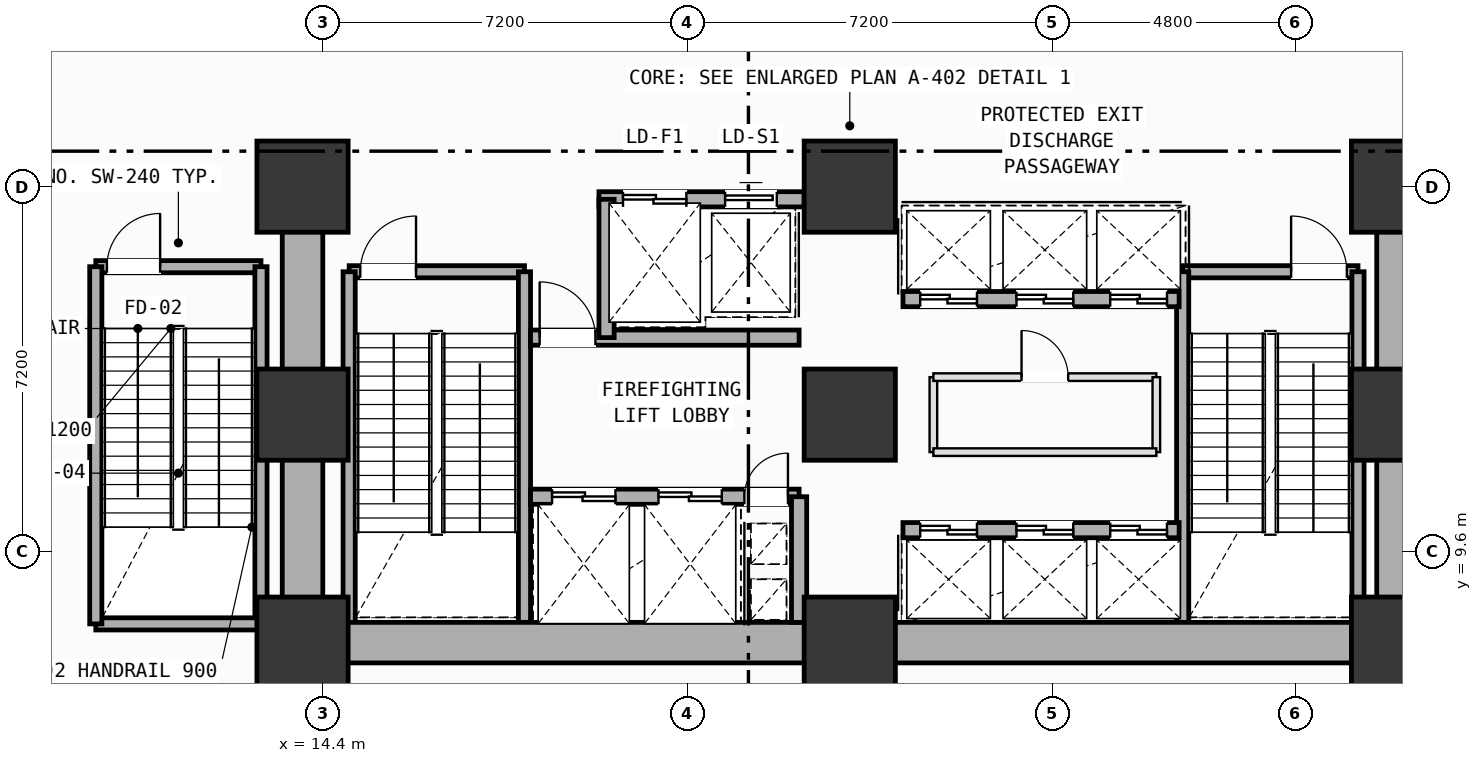
"""IFC4 building model, lengths in metres.
Left out: names, types, materials, properties, quantities, classifications, styles, units other than length and angle.
Written with IfcOpenShell. Run it as: python <this file> out.ifc"""

import sys

from ifc_helpers import new_model, si_unit, direction, frame, frame_2d, origin, origin_2d, place, context, subcontext, project, spatial, rectangle, extrude, element, fill, save


model = new_model("IFC4")
c1 = context("Model", 3, precision=1e-05, world=origin(), true_north=direction((0.0, 1.0)))
c2 = subcontext(c1, "Body", "Model", "MODEL_VIEW")
j1 = project(units=[si_unit("LENGTHUNIT", "METRE"), si_unit("PLANEANGLEUNIT", "RADIAN")], contexts=[c1])
p1 = place(None, origin())
s1 = spatial("IfcSite", under=j1, at=p1, CompositionType="ELEMENT")
p2 = place(p1, origin())
s2 = spatial("IfcBuilding", under=s1, at=p2, CompositionType="ELEMENT")
p3 = place(p2, origin())
s3 = spatial("IfcBuildingStorey", under=s2, at=p3, CompositionType="ELEMENT", Elevation=0.0)
for number, where, z_axis, x_axis in (
    (1, (14.0, 7.8, 0.0), (0.0, 0.0, 1.0), (1.0, 0.0, 0.0)),
    (2, (14.0, 12.3, 0.0), (0.0, 0.0, 1.0), (1.0, 0.0, 0.0)),
    (3, (14.0, 16.8, 0.0), (0.0, 0.0, 1.0), (1.0, 0.0, 0.0)),
    (4, (24.8, 7.8, 0.0), (0.0, 0.0, 1.0), (1.0, 0.0, 0.0)),
    (5, (24.8, 12.3, 0.0), (0.0, 0.0, 1.0), (1.0, 0.0, 0.0)),
    (6, (24.8, 16.8, 0.0), (0.0, 0.0, 1.0), (1.0, 0.0, 0.0)),
    (7, (35.6, 7.8, 0.0), (0.0, 0.0, 1.0), (1.0, 0.0, 0.0)),
    (8, (35.6, 12.3, 0.0), (0.0, 0.0, 1.0), (1.0, 0.0, 0.0)),
    (9, (35.6, 16.8, 0.0), (0.0, 0.0, 1.0), (1.0, 0.0, 0.0)),
):
    element("IfcColumn", number, at=place(p3, frame(where, z_axis=z_axis, x_axis=x_axis)), inside=s3, PredefinedType="COLUMN", context=c2, shape_type="SweptSolid", body=[
        extrude(rectangle(XDim=1.8, YDim=1.8, at=origin_2d()), origin(), (0.0, 0.0, 1.0), 5.4),
    ])
p4 = place(p3, frame((14.92, 15.12, 0.0), z_axis=(0.0, 0.0, 1.0), x_axis=(1.0, 0.0, 0.0)))
e10 = element("IfcWall", 10, at=p4, inside=s3, PredefinedType="SOLIDWALL", context=c2, shape_type="SweptSolid", body=[
    extrude(rectangle(XDim=3.46, YDim=0.24, at=frame_2d((1.73, 0.0))), origin(), (0.0, 0.0, 1.0), 5.15),
])
p5 = place(p4, frame((0.22, 0.0, 0.0)))
e11 = element("IfcOpeningElement", 11, at=p5, cuts=e10, PredefinedType="OPENING", context=c2, shape_type="SweptSolid", body=[
    extrude(rectangle(XDim=1.1, YDim=2.15, at=frame_2d((0.55, 1.075))), frame((0.0, 0.13, 0.0), z_axis=(0.0, -1.0, 0.0), x_axis=(1.0, 0.0, 0.0)), (0.0, 0.0, 1.0), 0.26),
])
for number, where, z_axis, x_axis in (
    (12, (18.38, 15.12, 0.0), (0.0, 0.0, 1.0), (0.0, -1.0, 0.0)),
    (13, (14.92, 8.2, 0.0), (0.0, 0.0, 1.0), (0.0, 1.0, 0.0)),
):
    element("IfcWall", number, at=place(p3, frame(where, z_axis=z_axis, x_axis=x_axis)), inside=s3, PredefinedType="SOLIDWALL", context=c2, shape_type="SweptSolid", body=[
        extrude(rectangle(XDim=6.92, YDim=0.24, at=frame_2d((3.46, 0.0))), origin(), (0.0, 0.0, 1.0), 5.15),
    ])
p6 = place(p3, frame((31.37, 15.12, 0.0), z_axis=(0.0, 0.0, 1.0), x_axis=(1.0, 0.0, 0.0)))
e14 = element("IfcWall", 14, at=p6, inside=s3, PredefinedType="SOLIDWALL", context=c2, shape_type="SweptSolid", body=[
    extrude(rectangle(XDim=3.46, YDim=0.24, at=frame_2d((1.73, 0.0))), origin(), (0.0, 0.0, 1.0), 5.15),
])
p7 = place(p6, frame((2.14, 0.0, 0.0)))
e15 = element("IfcOpeningElement", 15, at=p7, cuts=e14, PredefinedType="OPENING", context=c2, shape_type="SweptSolid", body=[
    extrude(rectangle(XDim=1.1, YDim=2.15, at=frame_2d((0.55, 1.075))), frame((0.0, 0.13, 0.0), z_axis=(0.0, -1.0, 0.0), x_axis=(1.0, 0.0, 0.0)), (0.0, 0.0, 1.0), 0.26),
])
for number, where, z_axis, x_axis in (
    (16, (34.83, 15.12, 0.0), (0.0, 0.0, 1.0), (0.0, -1.0, 0.0)),
    (17, (31.37, 8.2, 0.0), (0.0, 0.0, 1.0), (0.0, 1.0, 0.0)),
):
    element("IfcWall", number, at=place(p3, frame(where, z_axis=z_axis, x_axis=x_axis)), inside=s3, PredefinedType="SOLIDWALL", context=c2, shape_type="SweptSolid", body=[
        extrude(rectangle(XDim=6.92, YDim=0.24, at=frame_2d((3.46, 0.0))), origin(), (0.0, 0.0, 1.0), 5.15),
    ])
p8 = place(p3, frame((9.92, 15.22, 0.0), z_axis=(0.0, 0.0, 1.0), x_axis=(1.0, 0.0, 0.0)))
e18 = element("IfcWall", 18, at=p8, inside=s3, PredefinedType="SOLIDWALL", context=c2, shape_type="SweptSolid", body=[
    extrude(rectangle(XDim=3.26, YDim=0.24, at=frame_2d((1.63, 0.0))), origin(), (0.0, 0.0, 1.0), 5.15),
])
p9 = place(p8, frame((0.22, 0.0, 0.0)))
e19 = element("IfcOpeningElement", 19, at=p9, cuts=e18, PredefinedType="OPENING", context=c2, shape_type="SweptSolid", body=[
    extrude(rectangle(XDim=1.05, YDim=2.15, at=frame_2d((0.525, 1.075))), frame((0.0, 0.13, 0.0), z_axis=(0.0, -1.0, 0.0), x_axis=(1.0, 0.0, 0.0)), (0.0, 0.0, 1.0), 0.26),
])
p10 = place(p3, frame((13.18, 15.22, 0.0), z_axis=(0.0, 0.0, 1.0), x_axis=(0.0, -1.0, 0.0)))
e20 = element("IfcWall", 20, at=p10, inside=s3, PredefinedType="SOLIDWALL", context=c2, shape_type="SweptSolid", body=[
    extrude(rectangle(XDim=7.05, YDim=0.24, at=frame_2d((3.525, 0.0))), origin(), (0.0, 0.0, 1.0), 5.15),
])
p11 = place(p3, frame((13.18, 8.17, 0.0), z_axis=(0.0, 0.0, 1.0), x_axis=(-1.0, 0.0, 0.0)))
e21 = element("IfcWall", 21, at=p11, inside=s3, PredefinedType="SOLIDWALL", context=c2, shape_type="SweptSolid", body=[
    extrude(rectangle(XDim=3.26, YDim=0.24, at=frame_2d((1.63, 0.0))), origin(), (0.0, 0.0, 1.0), 5.15),
])
p12 = place(p3, frame((9.92, 8.17, 0.0), z_axis=(0.0, 0.0, 1.0), x_axis=(0.0, 1.0, 0.0)))
e22 = element("IfcWall", 22, at=p12, inside=s3, PredefinedType="SOLIDWALL", context=c2, shape_type="SweptSolid", body=[
    extrude(rectangle(XDim=7.05, YDim=0.24, at=frame_2d((3.525, 0.0))), origin(), (0.0, 0.0, 1.0), 5.15),
])
for number, where, z_axis, x_axis in (
    (23, (14.0, 7.8, 0.0), (0.0, 0.0, 1.0), (1.0, 0.0, 0.0)),
    (24, (24.8, 7.8, 0.0), (0.0, 0.0, 1.0), (1.0, 0.0, 0.0)),
):
    element("IfcWall", number, at=place(p3, frame(where, z_axis=z_axis, x_axis=x_axis)), inside=s3, PredefinedType="SHEAR", context=c2, shape_type="SweptSolid", body=[
        extrude(rectangle(XDim=10.8, YDim=0.8, at=frame_2d((5.4, 0.0))), origin(), (0.0, 0.0, 1.0), 5.15),
    ])
for number, where, z_axis, x_axis in (
    (25, (35.6, 7.8, 0.0), (0.0, 0.0, 1.0), (0.0, 1.0, 0.0)),
    (26, (14.0, 16.8, 0.0), (0.0, 0.0, 1.0), (0.0, -1.0, 0.0)),
):
    element("IfcWall", number, at=place(p3, frame(where, z_axis=z_axis, x_axis=x_axis)), inside=s3, PredefinedType="SHEAR", context=c2, shape_type="SweptSolid", body=[
        extrude(rectangle(XDim=9.0, YDim=0.8, at=frame_2d((4.5, 0.0))), origin(), (0.0, 0.0, 1.0), 5.15),
    ])
p13 = place(p3, frame((19.85, 16.55, 0.0), z_axis=(0.0, 0.0, 1.0), x_axis=(1.0, 0.0, 0.0)))
e27 = element("IfcWall", 27, at=p13, inside=s3, PredefinedType="SOLIDWALL", context=c2, shape_type="SweptSolid", body=[
    extrude(rectangle(XDim=4.05, YDim=0.3, at=frame_2d((2.025, 0.0))), origin(), (0.0, 0.0, 1.0), 5.15),
])
p14 = place(p13, frame((0.475, 0.0, 0.0)))
e28 = element("IfcOpeningElement", 28, at=p14, cuts=e27, PredefinedType="OPENING", context=c2, shape_type="SweptSolid", body=[
    extrude(rectangle(XDim=1.25, YDim=2.18, at=frame_2d((0.625, 1.09))), frame((0.0, 0.16, 0.0), z_axis=(0.0, -1.0, 0.0), x_axis=(1.0, 0.0, 0.0)), (0.0, 0.0, 1.0), 0.32),
])
p15 = place(p13, frame((2.49, 0.0, 0.0)))
e29 = element("IfcOpeningElement", 29, at=p15, cuts=e27, PredefinedType="OPENING", context=c2, shape_type="SweptSolid", body=[
    extrude(rectangle(XDim=1.02, YDim=2.12, at=frame_2d((0.51, 1.06))), frame((0.0, 0.16, 0.0), z_axis=(0.0, -1.0, 0.0), x_axis=(1.0, 0.0, 0.0)), (0.0, 0.0, 1.0), 0.32),
])
p16 = place(p3, frame((18.5, 10.68, 0.0), z_axis=(0.0, 0.0, 1.0), x_axis=(1.0, 0.0, 0.0)))
e30 = element("IfcWall", 30, at=p16, inside=s3, PredefinedType="SOLIDWALL", context=c2, shape_type="SweptSolid", body=[
    extrude(rectangle(XDim=5.3, YDim=0.3, at=frame_2d((2.65, 0.0))), origin(), (0.0, 0.0, 1.0), 5.15),
])
p17 = place(p16, frame((4.22, 0.0, 0.0)))
e31 = element("IfcOpeningElement", 31, at=p17, cuts=e30, PredefinedType="OPENING", context=c2, shape_type="SweptSolid", body=[
    extrude(rectangle(XDim=0.86, YDim=2.06, at=frame_2d((0.43, 1.03))), frame((0.0, 0.16, 0.0), z_axis=(0.0, -1.0, 0.0), x_axis=(1.0, 0.0, 0.0)), (0.0, 0.0, 1.0), 0.32),
])
p18 = place(p16, frame((0.425, 0.0, 0.0)))
e32 = element("IfcOpeningElement", 32, at=p18, cuts=e30, PredefinedType="OPENING", context=c2, shape_type="SweptSolid", body=[
    extrude(rectangle(XDim=1.25, YDim=2.18, at=frame_2d((0.625, 1.09))), frame((0.0, 0.16, 0.0), z_axis=(0.0, -1.0, 0.0), x_axis=(1.0, 0.0, 0.0)), (0.0, 0.0, 1.0), 0.32),
])
p19 = place(p16, frame((2.525, 0.0, 0.0)))
e33 = element("IfcOpeningElement", 33, at=p19, cuts=e30, PredefinedType="OPENING", context=c2, shape_type="SweptSolid", body=[
    extrude(rectangle(XDim=1.25, YDim=2.18, at=frame_2d((0.625, 1.09))), frame((0.0, 0.16, 0.0), z_axis=(0.0, -1.0, 0.0), x_axis=(1.0, 0.0, 0.0)), (0.0, 0.0, 1.0), 0.32),
])
p20 = place(p3, frame((18.5, 13.82, 0.0), z_axis=(0.0, 0.0, 1.0), x_axis=(1.0, 0.0, 0.0)))
e34 = element("IfcWall", 34, at=p20, inside=s3, PredefinedType="SOLIDWALL", context=c2, shape_type="SweptSolid", body=[
    extrude(rectangle(XDim=5.3, YDim=0.3, at=frame_2d((2.65, 0.0))), origin(), (0.0, 0.0, 1.0), 5.15),
])
p21 = place(p20, frame((0.18, 0.0, 0.0)))
e35 = element("IfcOpeningElement", 35, at=p21, cuts=e34, PredefinedType="OPENING", context=c2, shape_type="SweptSolid", body=[
    extrude(rectangle(XDim=1.1, YDim=2.15, at=frame_2d((0.55, 1.075))), frame((0.0, 0.16, 0.0), z_axis=(0.0, -1.0, 0.0), x_axis=(1.0, 0.0, 0.0)), (0.0, 0.0, 1.0), 0.32),
])
p22 = place(p3, frame((23.8, 8.2, 0.0), z_axis=(0.0, 0.0, 1.0), x_axis=(0.0, 1.0, 0.0)))
e36 = element("IfcWall", 36, at=p22, inside=s3, PredefinedType="SOLIDWALL", context=c2, shape_type="SweptSolid", body=[
    extrude(rectangle(XDim=2.48, YDim=0.3, at=frame_2d((1.24, 0.0))), origin(), (0.0, 0.0, 1.0), 5.15),
])
p23 = place(p3, frame((20.0, 13.82, 0.0), z_axis=(0.0, 0.0, 1.0), x_axis=(0.0, 1.0, 0.0)))
e37 = element("IfcWall", 37, at=p23, inside=s3, PredefinedType="SOLIDWALL", context=c2, shape_type="SweptSolid", body=[
    extrude(rectangle(XDim=2.73, YDim=0.3, at=frame_2d((1.365, 0.0))), origin(), (0.0, 0.0, 1.0), 5.15),
])
p24 = place(p3, frame((25.85, 10.02, 0.0), z_axis=(0.0, 0.0, 1.0), x_axis=(1.0, 0.0, 0.0)))
e38 = element("IfcWall", 38, at=p24, inside=s3, PredefinedType="SOLIDWALL", context=c2, shape_type="SweptSolid", body=[
    extrude(rectangle(XDim=5.45, YDim=0.3, at=frame_2d((2.725, 0.0))), origin(), (0.0, 0.0, 1.0), 5.15),
])
p25 = place(p24, frame((0.34, 0.0, 0.0)))
e39 = element("IfcOpeningElement", 39, at=p25, cuts=e38, PredefinedType="OPENING", context=c2, shape_type="SweptSolid", body=[
    extrude(rectangle(XDim=1.12, YDim=2.15, at=frame_2d((0.56, 1.075))), frame((0.0, 0.16, 0.0), z_axis=(0.0, -1.0, 0.0), x_axis=(1.0, 0.0, 0.0)), (0.0, 0.0, 1.0), 0.32),
])
p26 = place(p24, frame((2.24, 0.0, 0.0)))
e40 = element("IfcOpeningElement", 40, at=p26, cuts=e38, PredefinedType="OPENING", context=c2, shape_type="SweptSolid", body=[
    extrude(rectangle(XDim=1.12, YDim=2.15, at=frame_2d((0.56, 1.075))), frame((0.0, 0.16, 0.0), z_axis=(0.0, -1.0, 0.0), x_axis=(1.0, 0.0, 0.0)), (0.0, 0.0, 1.0), 0.32),
])
p27 = place(p24, frame((4.09, 0.0, 0.0)))
e41 = element("IfcOpeningElement", 41, at=p27, cuts=e38, PredefinedType="OPENING", context=c2, shape_type="SweptSolid", body=[
    extrude(rectangle(XDim=1.12, YDim=2.15, at=frame_2d((0.56, 1.075))), frame((0.0, 0.16, 0.0), z_axis=(0.0, -1.0, 0.0), x_axis=(1.0, 0.0, 0.0)), (0.0, 0.0, 1.0), 0.32),
])
p28 = place(p3, frame((25.85, 14.58, 0.0), z_axis=(0.0, 0.0, 1.0), x_axis=(1.0, 0.0, 0.0)))
e42 = element("IfcWall", 42, at=p28, inside=s3, PredefinedType="SOLIDWALL", context=c2, shape_type="SweptSolid", body=[
    extrude(rectangle(XDim=5.45, YDim=0.3, at=frame_2d((2.725, 0.0))), origin(), (0.0, 0.0, 1.0), 5.15),
])
p29 = place(p28, frame((0.34, 0.0, 0.0)))
e43 = element("IfcOpeningElement", 43, at=p29, cuts=e42, PredefinedType="OPENING", context=c2, shape_type="SweptSolid", body=[
    extrude(rectangle(XDim=1.12, YDim=2.15, at=frame_2d((0.56, 1.075))), frame((0.0, 0.16, 0.0), z_axis=(0.0, -1.0, 0.0), x_axis=(1.0, 0.0, 0.0)), (0.0, 0.0, 1.0), 0.32),
])
p30 = place(p28, frame((2.24, 0.0, 0.0)))
e44 = element("IfcOpeningElement", 44, at=p30, cuts=e42, PredefinedType="OPENING", context=c2, shape_type="SweptSolid", body=[
    extrude(rectangle(XDim=1.12, YDim=2.15, at=frame_2d((0.56, 1.075))), frame((0.0, 0.16, 0.0), z_axis=(0.0, -1.0, 0.0), x_axis=(1.0, 0.0, 0.0)), (0.0, 0.0, 1.0), 0.32),
])
p31 = place(p28, frame((4.09, 0.0, 0.0)))
e45 = element("IfcOpeningElement", 45, at=p31, cuts=e42, PredefinedType="OPENING", context=c2, shape_type="SweptSolid", body=[
    extrude(rectangle(XDim=1.12, YDim=2.15, at=frame_2d((0.56, 1.075))), frame((0.0, 0.16, 0.0), z_axis=(0.0, -1.0, 0.0), x_axis=(1.0, 0.0, 0.0)), (0.0, 0.0, 1.0), 0.32),
])
p32 = place(p3, frame((26.45, 11.56, 0.0), z_axis=(0.0, 0.0, 1.0), x_axis=(0.0, 1.0, 0.0)))
e46 = element("IfcWall", 46, at=p32, inside=s3, PredefinedType="PARTITIONING", context=c2, shape_type="SweptSolid", body=[
    extrude(rectangle(XDim=1.48, YDim=0.15, at=frame_2d((0.74, 0.0))), origin(), (0.0, 0.0, 1.0), 5.15),
])
p33 = place(p3, frame((26.45, 13.04, 0.0), z_axis=(0.0, 0.0, 1.0), x_axis=(1.0, 0.0, 0.0)))
e47 = element("IfcWall", 47, at=p33, inside=s3, PredefinedType="PARTITIONING", context=c2, shape_type="SweptSolid", body=[
    extrude(rectangle(XDim=4.4, YDim=0.15, at=frame_2d((2.2, 0.0))), origin(), (0.0, 0.0, 1.0), 5.15),
])
p34 = place(p33, frame((1.74, 0.0, 0.0)))
e48 = element("IfcOpeningElement", 48, at=p34, cuts=e47, PredefinedType="OPENING", context=c2, shape_type="SweptSolid", body=[
    extrude(rectangle(XDim=0.92, YDim=2.1, at=frame_2d((0.46, 1.05))), frame((0.0, 0.085, 0.0), z_axis=(0.0, -1.0, 0.0), x_axis=(1.0, 0.0, 0.0)), (0.0, 0.0, 1.0), 0.17),
])
p35 = place(p3, frame((30.85, 13.04, 0.0), z_axis=(0.0, 0.0, 1.0), x_axis=(0.0, -1.0, 0.0)))
e49 = element("IfcWall", 49, at=p35, inside=s3, PredefinedType="PARTITIONING", context=c2, shape_type="SweptSolid", body=[
    extrude(rectangle(XDim=1.48, YDim=0.15, at=frame_2d((0.74, 0.0))), origin(), (0.0, 0.0, 1.0), 5.15),
])
p36 = place(p3, frame((30.85, 11.56, 0.0), z_axis=(0.0, 0.0, 1.0), x_axis=(-1.0, 0.0, 0.0)))
e50 = element("IfcWall", 50, at=p36, inside=s3, PredefinedType="PARTITIONING", context=c2, shape_type="SweptSolid", body=[
    extrude(rectangle(XDim=4.4, YDim=0.15, at=frame_2d((2.2, 0.0))), origin(), (0.0, 0.0, 1.0), 5.15),
])
p37 = place(p5, origin())
e51 = element("IfcDoor", 51, at=p37, inside=s3, OperationType="SINGLE_SWING_RIGHT", PredefinedType="DOOR", context=c2, shape_type="SweptSolid", body=[
    extrude(rectangle(XDim=1.1, YDim=2.15, at=frame_2d((0.55, 1.075))), frame((0.0, 0.025, 0.0), z_axis=(0.0, -1.0, 0.0), x_axis=(1.0, 0.0, 0.0)), (0.0, 0.0, 1.0), 0.05),
])
fill(e11, e51)
p38 = place(p7, origin())
e52 = element("IfcDoor", 52, at=p38, inside=s3, OperationType="SINGLE_SWING_LEFT", PredefinedType="DOOR", context=c2, shape_type="SweptSolid", body=[
    extrude(rectangle(XDim=1.1, YDim=2.15, at=frame_2d((0.55, 1.075))), frame((0.0, 0.025, 0.0), z_axis=(0.0, -1.0, 0.0), x_axis=(1.0, 0.0, 0.0)), (0.0, 0.0, 1.0), 0.05),
])
fill(e15, e52)
p39 = place(p9, origin())
e53 = element("IfcDoor", 53, at=p39, inside=s3, OperationType="SINGLE_SWING_RIGHT", PredefinedType="DOOR", context=c2, shape_type="SweptSolid", body=[
    extrude(rectangle(XDim=1.05, YDim=2.15, at=frame_2d((0.525, 1.075))), frame((0.0, 0.025, 0.0), z_axis=(0.0, -1.0, 0.0), x_axis=(1.0, 0.0, 0.0)), (0.0, 0.0, 1.0), 0.05),
])
fill(e19, e53)
p40 = place(p17, origin())
e54 = element("IfcDoor", 54, at=p40, inside=s3, OperationType="SINGLE_SWING_RIGHT", PredefinedType="DOOR", context=c2, shape_type="SweptSolid", body=[
    extrude(rectangle(XDim=0.86, YDim=2.06, at=frame_2d((0.43, 1.03))), frame((0.0, 0.025, 0.0), z_axis=(0.0, -1.0, 0.0), x_axis=(1.0, 0.0, 0.0)), (0.0, 0.0, 1.0), 0.05),
])
fill(e31, e54)
p41 = place(p21, origin())
e55 = element("IfcDoor", 55, at=p41, inside=s3, OperationType="SINGLE_SWING_LEFT", PredefinedType="DOOR", context=c2, shape_type="SweptSolid", body=[
    extrude(rectangle(XDim=1.1, YDim=2.15, at=frame_2d((0.55, 1.075))), frame((0.0, 0.025, 0.0), z_axis=(0.0, -1.0, 0.0), x_axis=(1.0, 0.0, 0.0)), (0.0, 0.0, 1.0), 0.05),
])
fill(e35, e55)
p42 = place(p18, origin())
e56 = element("IfcDoor", 56, at=p42, inside=s3, OperationType="DOUBLE_DOOR_SLIDING", PredefinedType="DOOR", context=c2, shape_type="SweptSolid", body=[
    extrude(rectangle(XDim=1.25, YDim=2.18, at=frame_2d((0.625, 1.09))), frame((0.0, 0.025, 0.0), z_axis=(0.0, -1.0, 0.0), x_axis=(1.0, 0.0, 0.0)), (0.0, 0.0, 1.0), 0.05),
])
fill(e32, e56)
p43 = place(p19, origin())
e57 = element("IfcDoor", 57, at=p43, inside=s3, OperationType="DOUBLE_DOOR_SLIDING", PredefinedType="DOOR", context=c2, shape_type="SweptSolid", body=[
    extrude(rectangle(XDim=1.25, YDim=2.18, at=frame_2d((0.625, 1.09))), frame((0.0, 0.025, 0.0), z_axis=(0.0, -1.0, 0.0), x_axis=(1.0, 0.0, 0.0)), (0.0, 0.0, 1.0), 0.05),
])
fill(e33, e57)
p44 = place(p25, origin())
e58 = element("IfcDoor", 58, at=p44, inside=s3, OperationType="DOUBLE_DOOR_SLIDING", PredefinedType="DOOR", context=c2, shape_type="SweptSolid", body=[
    extrude(rectangle(XDim=1.12, YDim=2.15, at=frame_2d((0.56, 1.075))), frame((0.0, 0.025, 0.0), z_axis=(0.0, -1.0, 0.0), x_axis=(1.0, 0.0, 0.0)), (0.0, 0.0, 1.0), 0.05),
])
fill(e39, e58)
p45 = place(p26, origin())
e59 = element("IfcDoor", 59, at=p45, inside=s3, OperationType="DOUBLE_DOOR_SLIDING", PredefinedType="DOOR", context=c2, shape_type="SweptSolid", body=[
    extrude(rectangle(XDim=1.12, YDim=2.15, at=frame_2d((0.56, 1.075))), frame((0.0, 0.025, 0.0), z_axis=(0.0, -1.0, 0.0), x_axis=(1.0, 0.0, 0.0)), (0.0, 0.0, 1.0), 0.05),
])
fill(e40, e59)
p46 = place(p27, origin())
e60 = element("IfcDoor", 60, at=p46, inside=s3, OperationType="DOUBLE_DOOR_SLIDING", PredefinedType="DOOR", context=c2, shape_type="SweptSolid", body=[
    extrude(rectangle(XDim=1.12, YDim=2.15, at=frame_2d((0.56, 1.075))), frame((0.0, 0.025, 0.0), z_axis=(0.0, -1.0, 0.0), x_axis=(1.0, 0.0, 0.0)), (0.0, 0.0, 1.0), 0.05),
])
fill(e41, e60)
p47 = place(p29, origin())
e61 = element("IfcDoor", 61, at=p47, inside=s3, OperationType="DOUBLE_DOOR_SLIDING", PredefinedType="DOOR", context=c2, shape_type="SweptSolid", body=[
    extrude(rectangle(XDim=1.12, YDim=2.15, at=frame_2d((0.56, 1.075))), frame((0.0, 0.025, 0.0), z_axis=(0.0, -1.0, 0.0), x_axis=(1.0, 0.0, 0.0)), (0.0, 0.0, 1.0), 0.05),
])
fill(e43, e61)
p48 = place(p30, origin())
e62 = element("IfcDoor", 62, at=p48, inside=s3, OperationType="DOUBLE_DOOR_SLIDING", PredefinedType="DOOR", context=c2, shape_type="SweptSolid", body=[
    extrude(rectangle(XDim=1.12, YDim=2.15, at=frame_2d((0.56, 1.075))), frame((0.0, 0.025, 0.0), z_axis=(0.0, -1.0, 0.0), x_axis=(1.0, 0.0, 0.0)), (0.0, 0.0, 1.0), 0.05),
])
fill(e44, e62)
p49 = place(p31, origin())
e63 = element("IfcDoor", 63, at=p49, inside=s3, OperationType="DOUBLE_DOOR_SLIDING", PredefinedType="DOOR", context=c2, shape_type="SweptSolid", body=[
    extrude(rectangle(XDim=1.12, YDim=2.15, at=frame_2d((0.56, 1.075))), frame((0.0, 0.025, 0.0), z_axis=(0.0, -1.0, 0.0), x_axis=(1.0, 0.0, 0.0)), (0.0, 0.0, 1.0), 0.05),
])
fill(e45, e63)
p50 = place(p14, origin())
e64 = element("IfcDoor", 64, at=p50, inside=s3, OperationType="DOUBLE_DOOR_SLIDING", PredefinedType="DOOR", context=c2, shape_type="SweptSolid", body=[
    extrude(rectangle(XDim=1.25, YDim=2.18, at=frame_2d((0.625, 1.09))), frame((0.0, 0.025, 0.0), z_axis=(0.0, -1.0, 0.0), x_axis=(1.0, 0.0, 0.0)), (0.0, 0.0, 1.0), 0.05),
])
fill(e28, e64)
p51 = place(p15, origin())
e65 = element("IfcDoor", 65, at=p51, inside=s3, OperationType="SLIDING_TO_LEFT", PredefinedType="DOOR", context=c2, shape_type="SweptSolid", body=[
    extrude(rectangle(XDim=1.02, YDim=2.12, at=frame_2d((0.51, 1.06))), frame((0.0, 0.025, 0.0), z_axis=(0.0, -1.0, 0.0), x_axis=(1.0, 0.0, 0.0)), (0.0, 0.0, 1.0), 0.05),
])
fill(e29, e65)
p52 = place(p34, origin())
e66 = element("IfcDoor", 66, at=p52, inside=s3, OperationType="SINGLE_SWING_LEFT", PredefinedType="DOOR", context=c2, shape_type="SweptSolid", body=[
    extrude(rectangle(XDim=0.92, YDim=2.1, at=frame_2d((0.46, 1.05))), frame((0.0, 0.025, 0.0), z_axis=(0.0, -1.0, 0.0), x_axis=(1.0, 0.0, 0.0)), (0.0, 0.0, 1.0), 0.05),
])
fill(e48, e66)
save(model, sys.argv[1])
